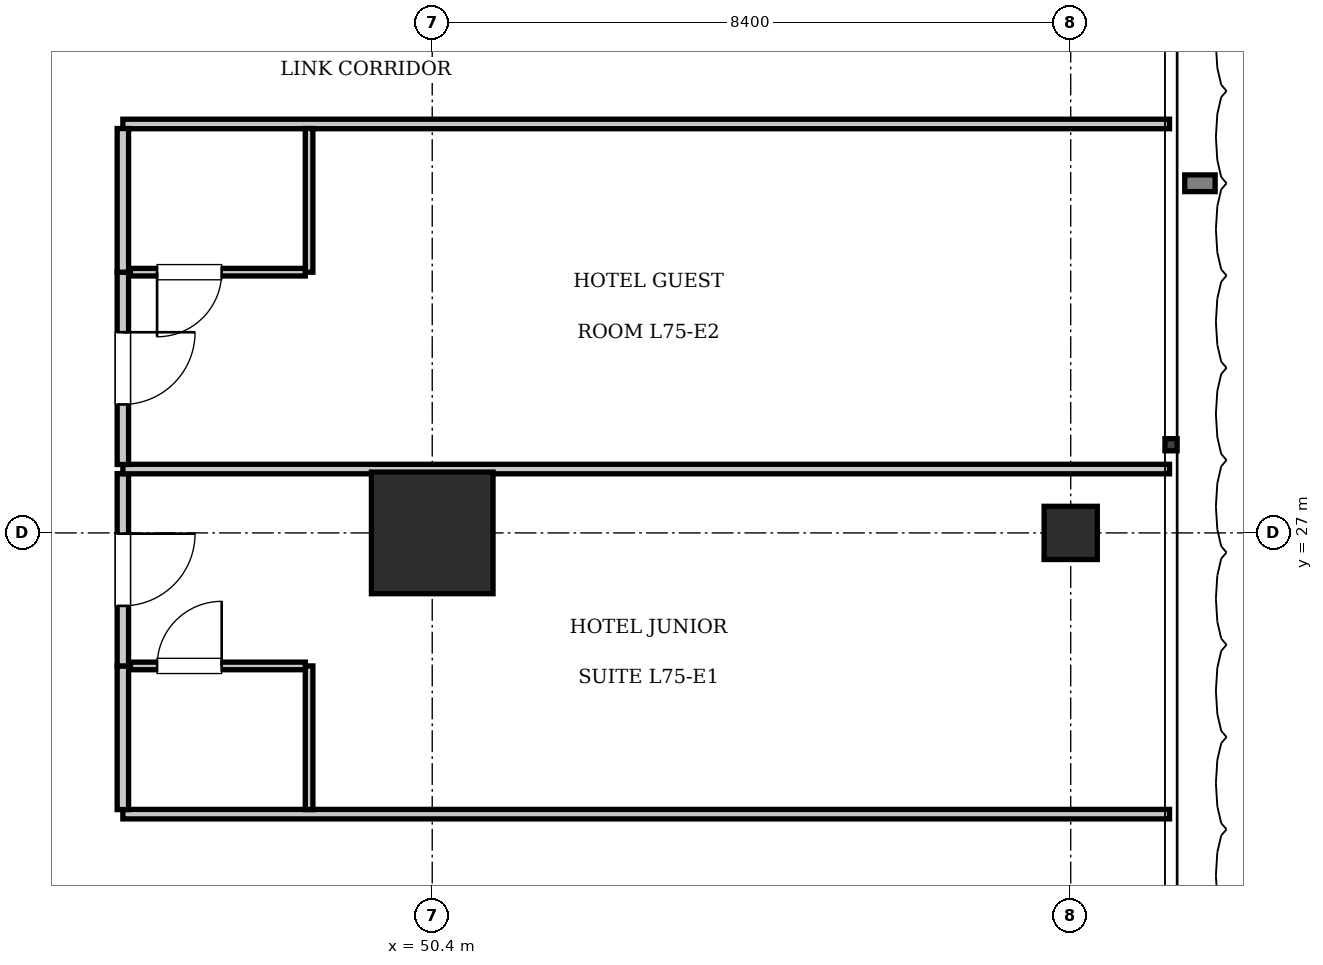
"""IFC4 building model, lengths in metres.
Left out: names, types, materials, properties, quantities, classifications, styles, units other than length and angle.
Written with IfcOpenShell. Run it as: python <this file> out.ifc"""

import sys

from ifc_helpers import new_model, si_unit, direction, frame, frame_2d, origin, origin_2d, place, context, subcontext, project, spatial, rectangle, extrude, element, fill, save


model = new_model("IFC4")
c1 = context("Model", 3, precision=1e-05, world=origin(), true_north=direction((0.0, 1.0)))
c2 = subcontext(c1, "Body", "Model", "MODEL_VIEW")
j1 = project(units=[si_unit("LENGTHUNIT", "METRE"), si_unit("PLANEANGLEUNIT", "RADIAN")], contexts=[c1])
p1 = place(None, origin())
s1 = spatial("IfcSite", under=j1, at=p1, CompositionType="ELEMENT")
p2 = place(p1, origin())
s2 = spatial("IfcBuilding", under=s1, at=p2, CompositionType="ELEMENT")
p3 = place(p2, frame((0.0, 0.0, 304.85)))
s3 = spatial("IfcBuildingStorey", under=s2, at=p3, CompositionType="ELEMENT", Elevation=304.85)
p4 = place(p3, frame((50.4, 27.0, 0.0), z_axis=(0.0, 0.0, 1.0), x_axis=(1.0, 0.0, 0.0)))
e1 = element("IfcColumn", 1, at=p4, inside=s3, PredefinedType="COLUMN", context=c2, shape_type="SweptSolid", body=[
    extrude(rectangle(XDim=1.6, YDim=1.6, at=origin_2d()), origin(), (0.0, 0.0, 1.0), 3.85),
])
p5 = place(p3, frame((58.8, 27.0, 0.0), z_axis=(0.0, 0.0, 1.0), x_axis=(1.0, 0.0, 0.0)))
e2 = element("IfcColumn", 2, at=p5, inside=s3, PredefinedType="COLUMN", context=c2, shape_type="SweptSolid", body=[
    extrude(rectangle(XDim=0.7, YDim=0.7, at=origin_2d()), origin(), (0.0, 0.0, 1.0), 3.85),
])
for number, where, z_axis, x_axis in (
    (3, (46.33, 23.3, 0.0), (0.0, 0.0, 1.0), (1.0, 0.0, 0.0)),
    (4, (46.33, 32.38, 0.0), (0.0, 0.0, 1.0), (1.0, 0.0, 0.0)),
):
    element("IfcWall", number, at=place(p3, frame(where, z_axis=z_axis, x_axis=x_axis)), inside=s3, PredefinedType="PARTITIONING", context=c2, shape_type="SweptSolid", body=[
        extrude(rectangle(XDim=13.77, YDim=0.125, at=frame_2d((6.885, 0.0))), origin(), (0.0, 0.0, 1.0), 3.61),
    ])
p6 = place(p3, frame((46.33, 23.36, 0.0), z_axis=(0.0, 0.0, 1.0), x_axis=(0.0, 1.0, 0.0)))
e5 = element("IfcWall", 5, at=p6, inside=s3, PredefinedType="PARTITIONING", context=c2, shape_type="SweptSolid", body=[
    extrude(rectangle(XDim=1.89, YDim=0.15, at=frame_2d((0.945, 0.0))), origin(), (0.0, 0.0, 1.0), 3.61),
])
p7 = place(p3, frame((46.33, 25.25, 0.0), z_axis=(0.0, 0.0, 1.0), x_axis=(0.0, 1.0, 0.0)))
e6 = element("IfcWall", 6, at=p7, inside=s3, PredefinedType="PARTITIONING", context=c2, shape_type="SweptSolid", body=[
    extrude(rectangle(XDim=2.53, YDim=0.15, at=frame_2d((1.265, 0.0))), origin(), (0.0, 0.0, 1.0), 3.61),
])
p8 = place(p7, frame((0.79, 0.0, 0.0)))
e7 = element("IfcOpeningElement", 7, at=p8, cuts=e6, PredefinedType="OPENING", context=c2, shape_type="SweptSolid", body=[
    extrude(rectangle(XDim=0.95, YDim=2.15, at=frame_2d((0.475, 1.075))), frame((0.0, 0.085, 0.0), z_axis=(0.0, -1.0, 0.0), x_axis=(1.0, 0.0, 0.0)), (0.0, 0.0, 1.0), 0.17),
])
p9 = place(p3, frame((48.78, 23.36, 0.0), z_axis=(0.0, 0.0, 1.0), x_axis=(0.0, 1.0, 0.0)))
e8 = element("IfcWall", 8, at=p9, inside=s3, PredefinedType="PARTITIONING", context=c2, shape_type="SweptSolid", body=[
    extrude(rectangle(XDim=1.89, YDim=0.1, at=frame_2d((0.945, 0.0))), origin(), (0.0, 0.0, 1.0), 3.61),
])
p10 = place(p3, frame((46.43, 25.25, 0.0), z_axis=(0.0, 0.0, 1.0), x_axis=(1.0, 0.0, 0.0)))
e9 = element("IfcWall", 9, at=p10, inside=s3, PredefinedType="PARTITIONING", context=c2, shape_type="SweptSolid", body=[
    extrude(rectangle(XDim=2.3, YDim=0.1, at=frame_2d((1.15, 0.0))), origin(), (0.0, 0.0, 1.0), 3.61),
])
p11 = place(p10, frame((0.35, 0.0, 0.0)))
e10 = element("IfcOpeningElement", 10, at=p11, cuts=e9, PredefinedType="OPENING", context=c2, shape_type="SweptSolid", body=[
    extrude(rectangle(XDim=0.85, YDim=2.1, at=frame_2d((0.425, 1.05))), frame((0.0, 0.06, 0.0), z_axis=(0.0, -1.0, 0.0), x_axis=(1.0, 0.0, 0.0)), (0.0, 0.0, 1.0), 0.12),
])
p12 = place(p3, frame((46.33, 27.84, 0.0), z_axis=(0.0, 0.0, 1.0), x_axis=(1.0, 0.0, 0.0)))
e11 = element("IfcWall", 11, at=p12, inside=s3, PredefinedType="PARTITIONING", context=c2, shape_type="SweptSolid", body=[
    extrude(rectangle(XDim=13.77, YDim=0.125, at=frame_2d((6.885, 0.0))), origin(), (0.0, 0.0, 1.0), 3.61),
])
p13 = place(p3, frame((46.33, 27.9, 0.0), z_axis=(0.0, 0.0, 1.0), x_axis=(0.0, 1.0, 0.0)))
e12 = element("IfcWall", 12, at=p13, inside=s3, PredefinedType="PARTITIONING", context=c2, shape_type="SweptSolid", body=[
    extrude(rectangle(XDim=2.53, YDim=0.15, at=frame_2d((1.265, 0.0))), origin(), (0.0, 0.0, 1.0), 3.61),
])
p14 = place(p13, frame((0.79, 0.0, 0.0)))
e13 = element("IfcOpeningElement", 13, at=p14, cuts=e12, PredefinedType="OPENING", context=c2, shape_type="SweptSolid", body=[
    extrude(rectangle(XDim=0.95, YDim=2.15, at=frame_2d((0.475, 1.075))), frame((0.0, 0.085, 0.0), z_axis=(0.0, -1.0, 0.0), x_axis=(1.0, 0.0, 0.0)), (0.0, 0.0, 1.0), 0.17),
])
p15 = place(p3, frame((46.33, 30.43, 0.0), z_axis=(0.0, 0.0, 1.0), x_axis=(0.0, 1.0, 0.0)))
e14 = element("IfcWall", 14, at=p15, inside=s3, PredefinedType="PARTITIONING", context=c2, shape_type="SweptSolid", body=[
    extrude(rectangle(XDim=1.89, YDim=0.15, at=frame_2d((0.945, 0.0))), origin(), (0.0, 0.0, 1.0), 3.61),
])
p16 = place(p3, frame((48.78, 30.43, 0.0), z_axis=(0.0, 0.0, 1.0), x_axis=(0.0, 1.0, 0.0)))
e15 = element("IfcWall", 15, at=p16, inside=s3, PredefinedType="PARTITIONING", context=c2, shape_type="SweptSolid", body=[
    extrude(rectangle(XDim=1.89, YDim=0.1, at=frame_2d((0.945, 0.0))), origin(), (0.0, 0.0, 1.0), 3.61),
])
p17 = place(p3, frame((46.43, 30.43, 0.0), z_axis=(0.0, 0.0, 1.0), x_axis=(1.0, 0.0, 0.0)))
e16 = element("IfcWall", 16, at=p17, inside=s3, PredefinedType="PARTITIONING", context=c2, shape_type="SweptSolid", body=[
    extrude(rectangle(XDim=2.3, YDim=0.1, at=frame_2d((1.15, 0.0))), origin(), (0.0, 0.0, 1.0), 3.61),
])
p18 = place(p17, frame((0.35, 0.0, 0.0)))
e17 = element("IfcOpeningElement", 17, at=p18, cuts=e16, PredefinedType="OPENING", context=c2, shape_type="SweptSolid", body=[
    extrude(rectangle(XDim=0.85, YDim=2.1, at=frame_2d((0.425, 1.05))), frame((0.0, 0.06, 0.0), z_axis=(0.0, -1.0, 0.0), x_axis=(1.0, 0.0, 0.0)), (0.0, 0.0, 1.0), 0.12),
])
p19 = place(p11, origin())
e18 = element("IfcDoor", 18, at=p19, inside=s3, OperationType="SINGLE_SWING_RIGHT", PredefinedType="DOOR", context=c2, shape_type="SweptSolid", body=[
    extrude(rectangle(XDim=0.85, YDim=2.1, at=frame_2d((0.425, 1.05))), frame((0.0, 0.025, 0.0), z_axis=(0.0, -1.0, 0.0), x_axis=(1.0, 0.0, 0.0)), (0.0, 0.0, 1.0), 0.05),
])
fill(e10, e18)
p20 = place(p8, frame((0.95, 0.0, 0.0), z_axis=(0.0, 0.0, 1.0), x_axis=(-1.0, 0.0, 0.0)))
e19 = element("IfcDoor", 19, at=p20, inside=s3, OperationType="SINGLE_SWING_LEFT", PredefinedType="DOOR", context=c2, shape_type="SweptSolid", body=[
    extrude(rectangle(XDim=0.95, YDim=2.15, at=frame_2d((0.475, 1.075))), frame((0.0, 0.025, 0.0), z_axis=(0.0, -1.0, 0.0), x_axis=(1.0, 0.0, 0.0)), (0.0, 0.0, 1.0), 0.05),
])
fill(e7, e19)
p21 = place(p18, frame((0.85, 0.0, 0.0), z_axis=(0.0, 0.0, 1.0), x_axis=(-1.0, 0.0, 0.0)))
e20 = element("IfcDoor", 20, at=p21, inside=s3, OperationType="SINGLE_SWING_RIGHT", PredefinedType="DOOR", context=c2, shape_type="SweptSolid", body=[
    extrude(rectangle(XDim=0.85, YDim=2.1, at=frame_2d((0.425, 1.05))), frame((0.0, 0.025, 0.0), z_axis=(0.0, -1.0, 0.0), x_axis=(1.0, 0.0, 0.0)), (0.0, 0.0, 1.0), 0.05),
])
fill(e17, e20)
p22 = place(p14, frame((0.95, 0.0, 0.0), z_axis=(0.0, 0.0, 1.0), x_axis=(-1.0, 0.0, 0.0)))
e21 = element("IfcDoor", 21, at=p22, inside=s3, OperationType="SINGLE_SWING_LEFT", PredefinedType="DOOR", context=c2, shape_type="SweptSolid", body=[
    extrude(rectangle(XDim=0.95, YDim=2.15, at=frame_2d((0.475, 1.075))), frame((0.0, 0.025, 0.0), z_axis=(0.0, -1.0, 0.0), x_axis=(1.0, 0.0, 0.0)), (0.0, 0.0, 1.0), 0.05),
])
fill(e13, e21)
save(model, sys.argv[1])
